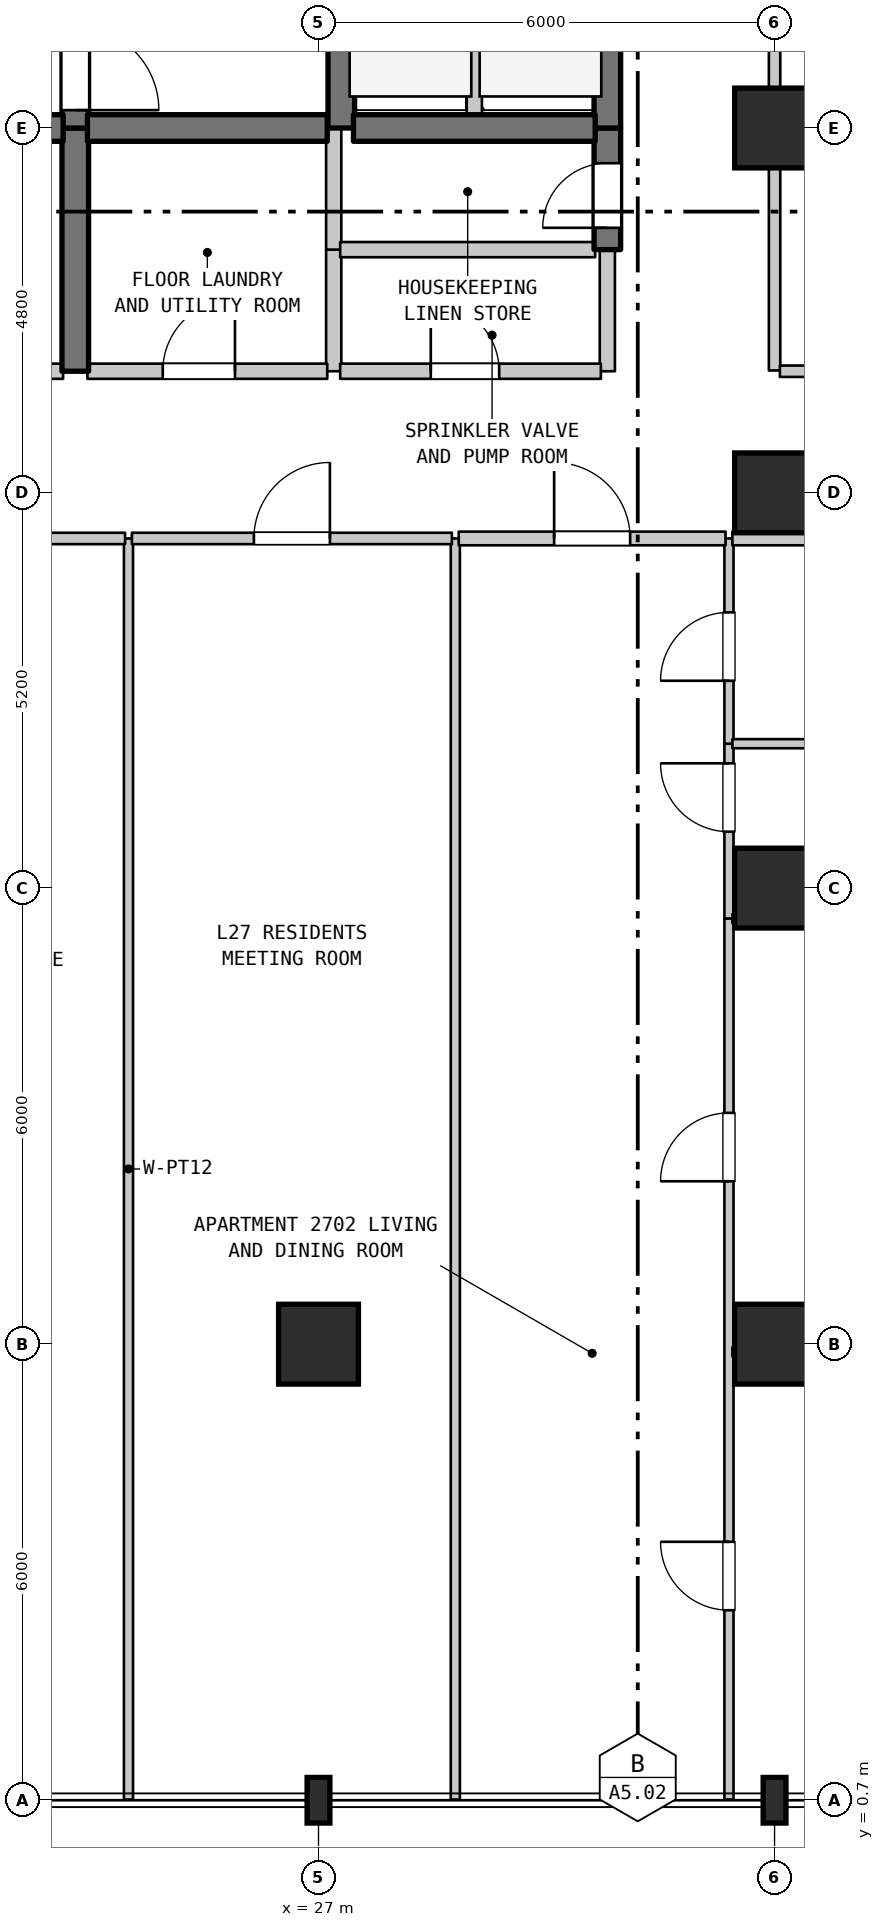
"""IFC4 building model, lengths in metres.
Left out: names, types, materials, properties, quantities, classifications, styles, units other than length and angle.
Written with IfcOpenShell. Run it as: python <this file> out.ifc"""

import sys

from ifc_helpers import new_model, si_unit, direction, frame, frame_2d, origin, origin_2d, place, context, subcontext, project, spatial, rectangle, i_section, extrude, element, fill, save


model = new_model("IFC4")
c1 = context("Model", 3, precision=1e-05, world=origin(), true_north=direction((0.0, 1.0)))
c2 = subcontext(c1, "Body", "Model", "MODEL_VIEW")
j1 = project(units=[si_unit("LENGTHUNIT", "METRE"), si_unit("PLANEANGLEUNIT", "RADIAN")], contexts=[c1])
p1 = place(None, origin())
s1 = spatial("IfcSite", under=j1, at=p1, CompositionType="ELEMENT")
p2 = place(p1, origin())
s2 = spatial("IfcBuilding", under=s1, at=p2, CompositionType="ELEMENT")
p3 = place(p2, frame((0.0, 0.0, 113.1)))
s3 = spatial("IfcBuildingStorey", under=s2, at=p3, CompositionType="ELEMENT", Elevation=113.1)
p4 = place(p3, frame((27.0, 0.7, 0.0), z_axis=(0.0, 0.0, 1.0), x_axis=(1.0, 0.0, 0.0)))
e1 = element("IfcColumn", 1, at=p4, inside=s3, PredefinedType="COLUMN", context=c2, shape_type="SweptSolid", body=[
    extrude(i_section(OverallWidth=0.3, OverallDepth=0.6, WebThickness=0.015, FlangeThickness=0.03, FilletRadius=0.027, at=origin_2d()), origin(), (0.0, 0.0, 1.0), 3.7),
])
p5 = place(p3, frame((27.0, 6.7, 0.0), z_axis=(0.0, 0.0, 1.0), x_axis=(1.0, 0.0, 0.0)))
e2 = element("IfcColumn", 2, at=p5, inside=s3, PredefinedType="COLUMN", context=c2, shape_type="SweptSolid", body=[
    extrude(rectangle(XDim=1.05, YDim=1.05, at=origin_2d()), origin(), (0.0, 0.0, 1.0), 3.7),
])
p6 = place(p3, frame((33.0, 0.7, 0.0), z_axis=(0.0, 0.0, 1.0), x_axis=(1.0, 0.0, 0.0)))
e3 = element("IfcColumn", 3, at=p6, inside=s3, PredefinedType="COLUMN", context=c2, shape_type="SweptSolid", body=[
    extrude(i_section(OverallWidth=0.3, OverallDepth=0.6, WebThickness=0.015, FlangeThickness=0.03, FilletRadius=0.027, at=origin_2d()), origin(), (0.0, 0.0, 1.0), 3.7),
])
for number, where, z_axis, x_axis in (
    (4, (33.0, 6.7, 0.0), (0.0, 0.0, 1.0), (1.0, 0.0, 0.0)),
    (5, (33.0, 12.7, 0.0), (0.0, 0.0, 1.0), (1.0, 0.0, 0.0)),
    (6, (33.0, 17.9, 0.0), (0.0, 0.0, 1.0), (1.0, 0.0, 0.0)),
    (7, (33.0, 22.7, 0.0), (0.0, 0.0, 1.0), (1.0, 0.0, 0.0)),
):
    element("IfcColumn", number, at=place(p3, frame(where, z_axis=z_axis, x_axis=x_axis)), inside=s3, PredefinedType="COLUMN", context=c2, shape_type="SweptSolid", body=[
        extrude(rectangle(XDim=1.05, YDim=1.05, at=origin_2d()), origin(), (0.0, 0.0, 1.0), 3.7),
    ])
p7 = place(p3, frame((23.8, 19.5, 0.0), z_axis=(0.0, 0.0, 1.0), x_axis=(0.0, 1.0, 0.0)))
e8 = element("IfcWall", 8, at=p7, inside=s3, PredefinedType="SHEAR", context=c2, shape_type="SweptSolid", body=[
    extrude(rectangle(XDim=3.2, YDim=0.35, at=frame_2d((1.6, 0.0))), origin(), (0.0, 0.0, 1.0), 3.385),
])
p8 = place(p3, frame((23.8, 22.7, 0.0), z_axis=(0.0, 0.0, 1.0), x_axis=(0.0, 1.0, 0.0)))
e9 = element("IfcWall", 9, at=p8, inside=s3, PredefinedType="SHEAR", context=c2, shape_type="SweptSolid", body=[
    extrude(rectangle(XDim=5.5, YDim=0.35, at=frame_2d((2.75, 0.0))), origin(), (0.0, 0.0, 1.0), 3.385),
])
p9 = place(p8, frame((0.235, 0.0, 0.0)))
e10 = element("IfcOpeningElement", 10, at=p9, cuts=e9, PredefinedType="OPENING", context=c2, shape_type="SweptSolid", body=[
    extrude(rectangle(XDim=1.1, YDim=2.15, at=frame_2d((0.55, 1.075))), frame((0.0, 0.185, 0.0), z_axis=(0.0, -1.0, 0.0), x_axis=(1.0, 0.0, 0.0)), (0.0, 0.0, 1.0), 0.37),
])
p10 = place(p3, frame((24.5, 0.71, 0.0), z_axis=(0.0, 0.0, 1.0), x_axis=(0.0, 1.0, 0.0)))
e11 = element("IfcWall", 11, at=p10, inside=s3, PredefinedType="PARTITIONING", context=c2, shape_type="SweptSolid", body=[
    extrude(rectangle(XDim=16.59, YDim=0.12, at=frame_2d((8.295, 0.0))), origin(), (0.0, 0.0, 1.0), 3.385),
])
p11 = place(p3, frame((27.2, 19.5, 0.0), z_axis=(0.0, 0.0, 1.0), x_axis=(0.0, 1.0, 0.0)))
e12 = element("IfcWall", 12, at=p11, inside=s3, PredefinedType="STANDARD", context=c2, shape_type="SweptSolid", body=[
    extrude(rectangle(XDim=1.6, YDim=0.2, at=frame_2d((0.8, 0.0))), origin(), (0.0, 0.0, 1.0), 3.385),
])
p12 = place(p3, frame((27.2, 21.1, 0.0), z_axis=(0.0, 0.0, 1.0), x_axis=(0.0, 1.0, 0.0)))
e13 = element("IfcWall", 13, at=p12, inside=s3, PredefinedType="STANDARD", context=c2, shape_type="SweptSolid", body=[
    extrude(rectangle(XDim=1.6, YDim=0.2, at=frame_2d((0.8, 0.0))), origin(), (0.0, 0.0, 1.0), 3.385),
])
p13 = place(p3, frame((27.3, 22.7, 0.0), z_axis=(0.0, 0.0, 1.0), x_axis=(0.0, 1.0, 0.0)))
e14 = element("IfcWall", 14, at=p13, inside=s3, PredefinedType="SHEAR", context=c2, shape_type="SweptSolid", body=[
    extrude(rectangle(XDim=2.9, YDim=0.35, at=frame_2d((1.45, 0.0))), origin(), (0.0, 0.0, 1.0), 3.385),
])
p14 = place(p3, frame((28.8, 0.71, 0.0), z_axis=(0.0, 0.0, 1.0), x_axis=(0.0, 1.0, 0.0)))
e15 = element("IfcWall", 15, at=p14, inside=s3, PredefinedType="PARTITIONING", context=c2, shape_type="SweptSolid", body=[
    extrude(rectangle(XDim=16.59, YDim=0.12, at=frame_2d((8.295, 0.0))), origin(), (0.0, 0.0, 1.0), 3.385),
])
p15 = place(p3, frame((29.05, 22.7, 0.0), z_axis=(0.0, 0.0, 1.0), x_axis=(0.0, 1.0, 0.0)))
e16 = element("IfcWall", 16, at=p15, inside=s3, PredefinedType="STANDARD", context=c2, shape_type="SweptSolid", body=[
    extrude(rectangle(XDim=2.9, YDim=0.2, at=frame_2d((1.45, 0.0))), origin(), (0.0, 0.0, 1.0), 3.385),
])
p16 = place(p3, frame((30.8, 19.5, 0.0), z_axis=(0.0, 0.0, 1.0), x_axis=(0.0, 1.0, 0.0)))
e17 = element("IfcWall", 17, at=p16, inside=s3, PredefinedType="STANDARD", context=c2, shape_type="SweptSolid", body=[
    extrude(rectangle(XDim=1.6, YDim=0.2, at=frame_2d((0.8, 0.0))), origin(), (0.0, 0.0, 1.0), 3.385),
])
p17 = place(p3, frame((30.8, 21.1, 0.0), z_axis=(0.0, 0.0, 1.0), x_axis=(0.0, 1.0, 0.0)))
e18 = element("IfcWall", 18, at=p17, inside=s3, PredefinedType="SHEAR", context=c2, shape_type="SweptSolid", body=[
    extrude(rectangle(XDim=1.6, YDim=0.35, at=frame_2d((0.8, 0.0))), origin(), (0.0, 0.0, 1.0), 3.385),
])
p18 = place(p17, frame((0.287, 0.0, 0.0)))
e19 = element("IfcOpeningElement", 19, at=p18, cuts=e18, PredefinedType="OPENING", context=c2, shape_type="SweptSolid", body=[
    extrude(rectangle(XDim=0.85, YDim=2.1, at=frame_2d((0.425, 1.05))), frame((0.0, 0.185, 0.0), z_axis=(0.0, -1.0, 0.0), x_axis=(1.0, 0.0, 0.0)), (0.0, 0.0, 1.0), 0.37),
])
p19 = place(p3, frame((30.8, 22.7, 0.0), z_axis=(0.0, 0.0, 1.0), x_axis=(0.0, 1.0, 0.0)))
e20 = element("IfcWall", 20, at=p19, inside=s3, PredefinedType="SHEAR", context=c2, shape_type="SweptSolid", body=[
    extrude(rectangle(XDim=2.9, YDim=0.35, at=frame_2d((1.45, 0.0))), origin(), (0.0, 0.0, 1.0), 3.385),
])
p20 = place(p3, frame((32.4, 0.71, 0.0), z_axis=(0.0, 0.0, 1.0), x_axis=(0.0, 1.0, 0.0)))
e21 = element("IfcWall", 21, at=p20, inside=s3, PredefinedType="PARTITIONING", context=c2, shape_type="SweptSolid", body=[
    extrude(rectangle(XDim=11.59, YDim=0.12, at=frame_2d((5.795, 0.0))), origin(), (0.0, 0.0, 1.0), 3.385),
])
p21 = place(p20, frame((2.49, 0.0, 0.0)))
e22 = element("IfcOpeningElement", 22, at=p21, cuts=e21, PredefinedType="OPENING", context=c2, shape_type="SweptSolid", body=[
    extrude(rectangle(XDim=0.9, YDim=2.15, at=frame_2d((0.45, 1.075))), frame((0.0, 0.07, 0.0), z_axis=(0.0, -1.0, 0.0), x_axis=(1.0, 0.0, 0.0)), (0.0, 0.0, 1.0), 0.14),
])
p22 = place(p20, frame((8.133, 0.0, 0.0)))
e23 = element("IfcOpeningElement", 23, at=p22, cuts=e21, PredefinedType="OPENING", context=c2, shape_type="SweptSolid", body=[
    extrude(rectangle(XDim=0.9, YDim=2.15, at=frame_2d((0.45, 1.075))), frame((0.0, 0.07, 0.0), z_axis=(0.0, -1.0, 0.0), x_axis=(1.0, 0.0, 0.0)), (0.0, 0.0, 1.0), 0.14),
])
p23 = place(p3, frame((32.4, 12.3, 0.0), z_axis=(0.0, 0.0, 1.0), x_axis=(0.0, 1.0, 0.0)))
e24 = element("IfcWall", 24, at=p23, inside=s3, PredefinedType="PARTITIONING", context=c2, shape_type="SweptSolid", body=[
    extrude(rectangle(XDim=2.3, YDim=0.12, at=frame_2d((1.15, 0.0))), origin(), (0.0, 0.0, 1.0), 3.385),
])
p24 = place(p23, frame((1.142, 0.0, 0.0)))
e25 = element("IfcOpeningElement", 25, at=p24, cuts=e24, PredefinedType="OPENING", context=c2, shape_type="SweptSolid", body=[
    extrude(rectangle(XDim=0.9, YDim=2.15, at=frame_2d((0.45, 1.075))), frame((0.0, 0.07, 0.0), z_axis=(0.0, -1.0, 0.0), x_axis=(1.0, 0.0, 0.0)), (0.0, 0.0, 1.0), 0.14),
])
p25 = place(p3, frame((32.4, 14.6, 0.0), z_axis=(0.0, 0.0, 1.0), x_axis=(0.0, 1.0, 0.0)))
e26 = element("IfcWall", 26, at=p25, inside=s3, PredefinedType="PARTITIONING", context=c2, shape_type="SweptSolid", body=[
    extrude(rectangle(XDim=2.7, YDim=0.12, at=frame_2d((1.35, 0.0))), origin(), (0.0, 0.0, 1.0), 3.385),
])
p26 = place(p25, frame((0.828, 0.0, 0.0)))
e27 = element("IfcOpeningElement", 27, at=p26, cuts=e26, PredefinedType="OPENING", context=c2, shape_type="SweptSolid", body=[
    extrude(rectangle(XDim=0.9, YDim=2.1, at=frame_2d((0.45, 1.05))), frame((0.0, 0.07, 0.0), z_axis=(0.0, -1.0, 0.0), x_axis=(1.0, 0.0, 0.0)), (0.0, 0.0, 1.0), 0.14),
])
p27 = place(p3, frame((33.0, 19.51, 0.0), z_axis=(0.0, 0.0, 1.0), x_axis=(0.0, 1.0, 0.0)))
e28 = element("IfcWall", 28, at=p27, inside=s3, PredefinedType="STANDARD", context=c2, shape_type="SweptSolid", body=[
    extrude(rectangle(XDim=6.18, YDim=0.15, at=frame_2d((3.09, 0.0))), origin(), (0.0, 0.0, 1.0), 2.935),
])
p28 = place(p3, frame((32.445, 6.6, 0.0), z_axis=(0.0, 0.0, 1.0), x_axis=(1.0, 0.0, 0.0)))
e29 = element("IfcWall", 29, at=p28, inside=s3, PredefinedType="PARTITIONING", context=c2, shape_type="SweptSolid", body=[
    extrude(rectangle(XDim=4.16, YDim=0.12, at=frame_2d((2.08, 0.0))), origin(), (0.0, 0.0, 1.0), 2.935),
])
for number, where, z_axis, x_axis in (
    (30, (32.445, 12.3, 0.0), (0.0, 0.0, 1.0), (1.0, 0.0, 0.0)),
    (31, (32.445, 14.6, 0.0), (0.0, 0.0, 1.0), (1.0, 0.0, 0.0)),
):
    element("IfcWall", number, at=place(p3, frame(where, z_axis=z_axis, x_axis=x_axis)), inside=s3, PredefinedType="PARTITIONING", context=c2, shape_type="SweptSolid", body=[
        extrude(rectangle(XDim=4.16, YDim=0.12, at=frame_2d((2.08, 0.0))), origin(), (0.0, 0.0, 1.0), 3.385),
    ])
p29 = place(p3, frame((20.545, 17.3, 0.0), z_axis=(0.0, 0.0, 1.0), x_axis=(1.0, 0.0, 0.0)))
e32 = element("IfcWall", 32, at=p29, inside=s3, PredefinedType="STANDARD", context=c2, shape_type="SweptSolid", body=[
    extrude(rectangle(XDim=3.91, YDim=0.15, at=frame_2d((1.955, 0.0))), origin(), (0.0, 0.0, 1.0), 3.385),
])
p30 = place(p29, frame((1.455, 0.0, 0.0)))
e33 = element("IfcOpeningElement", 33, at=p30, cuts=e32, PredefinedType="OPENING", context=c2, shape_type="SweptSolid", body=[
    extrude(rectangle(XDim=1.0, YDim=2.15, at=frame_2d((0.5, 1.075))), frame((0.0, 0.085, 0.0), z_axis=(0.0, -1.0, 0.0), x_axis=(1.0, 0.0, 0.0)), (0.0, 0.0, 1.0), 0.17),
])
p31 = place(p3, frame((24.545, 17.3, 0.0), z_axis=(0.0, 0.0, 1.0), x_axis=(1.0, 0.0, 0.0)))
e34 = element("IfcWall", 34, at=p31, inside=s3, PredefinedType="STANDARD", context=c2, shape_type="SweptSolid", body=[
    extrude(rectangle(XDim=4.21, YDim=0.15, at=frame_2d((2.105, 0.0))), origin(), (0.0, 0.0, 1.0), 3.385),
])
p32 = place(p31, frame((1.605, 0.0, 0.0)))
e35 = element("IfcOpeningElement", 35, at=p32, cuts=e34, PredefinedType="OPENING", context=c2, shape_type="SweptSolid", body=[
    extrude(rectangle(XDim=1.0, YDim=2.15, at=frame_2d((0.5, 1.075))), frame((0.0, 0.085, 0.0), z_axis=(0.0, -1.0, 0.0), x_axis=(1.0, 0.0, 0.0)), (0.0, 0.0, 1.0), 0.17),
])
p33 = place(p3, frame((28.845, 17.3, 0.0), z_axis=(0.0, 0.0, 1.0), x_axis=(1.0, 0.0, 0.0)))
e36 = element("IfcWall", 36, at=p33, inside=s3, PredefinedType="STANDARD", context=c2, shape_type="SweptSolid", body=[
    extrude(rectangle(XDim=3.51, YDim=0.18, at=frame_2d((1.755, 0.0))), origin(), (0.0, 0.0, 1.0), 3.385),
])
p34 = place(p33, frame((1.255, 0.0, 0.0)))
e37 = element("IfcOpeningElement", 37, at=p34, cuts=e36, PredefinedType="OPENING", context=c2, shape_type="SweptSolid", body=[
    extrude(rectangle(XDim=1.0, YDim=2.15, at=frame_2d((0.5, 1.075))), frame((0.0, 0.1, 0.0), z_axis=(0.0, -1.0, 0.0), x_axis=(1.0, 0.0, 0.0)), (0.0, 0.0, 1.0), 0.2),
])
p35 = place(p3, frame((32.445, 17.3, 0.0), z_axis=(0.0, 0.0, 1.0), x_axis=(1.0, 0.0, 0.0)))
e38 = element("IfcWall", 38, at=p35, inside=s3, PredefinedType="STANDARD", context=c2, shape_type="SweptSolid", body=[
    extrude(rectangle(XDim=4.16, YDim=0.18, at=frame_2d((2.08, 0.0))), origin(), (0.0, 0.0, 1.0), 3.385),
])
p36 = place(p3, frame((19.16, 19.5, 0.0), z_axis=(0.0, 0.0, 1.0), x_axis=(1.0, 0.0, 0.0)))
e39 = element("IfcWall", 39, at=p36, inside=s3, PredefinedType="STANDARD", context=c2, shape_type="SweptSolid", body=[
    extrude(rectangle(XDim=4.48, YDim=0.2, at=frame_2d((2.24, 0.0))), origin(), (0.0, 0.0, 1.0), 3.385),
])
p37 = place(p36, frame((1.64, 0.0, 0.0)))
e40 = element("IfcOpeningElement", 40, at=p37, cuts=e39, PredefinedType="OPENING", context=c2, shape_type="SweptSolid", body=[
    extrude(rectangle(XDim=1.2, YDim=2.2, at=frame_2d((0.6, 1.1))), frame((0.0, 0.11, 0.0), z_axis=(0.0, -1.0, 0.0), x_axis=(1.0, 0.0, 0.0)), (0.0, 0.0, 1.0), 0.22),
])
p38 = place(p3, frame((23.96, 19.5, 0.0), z_axis=(0.0, 0.0, 1.0), x_axis=(1.0, 0.0, 0.0)))
e41 = element("IfcWall", 41, at=p38, inside=s3, PredefinedType="STANDARD", context=c2, shape_type="SweptSolid", body=[
    extrude(rectangle(XDim=3.155, YDim=0.2, at=frame_2d((1.578, 0.0))), origin(), (0.0, 0.0, 1.0), 3.385),
])
p39 = place(p38, frame((0.991, 0.0, 0.0)))
e42 = element("IfcOpeningElement", 42, at=p39, cuts=e41, PredefinedType="OPENING", context=c2, shape_type="SweptSolid", body=[
    extrude(rectangle(XDim=0.95, YDim=2.15, at=frame_2d((0.475, 1.075))), frame((0.0, 0.11, 0.0), z_axis=(0.0, -1.0, 0.0), x_axis=(1.0, 0.0, 0.0)), (0.0, 0.0, 1.0), 0.22),
])
p40 = place(p3, frame((27.285, 19.5, 0.0), z_axis=(0.0, 0.0, 1.0), x_axis=(1.0, 0.0, 0.0)))
e43 = element("IfcWall", 43, at=p40, inside=s3, PredefinedType="STANDARD", context=c2, shape_type="SweptSolid", body=[
    extrude(rectangle(XDim=3.43, YDim=0.2, at=frame_2d((1.715, 0.0))), origin(), (0.0, 0.0, 1.0), 3.385),
])
p41 = place(p40, frame((1.192, 0.0, 0.0)))
e44 = element("IfcOpeningElement", 44, at=p41, cuts=e43, PredefinedType="OPENING", context=c2, shape_type="SweptSolid", body=[
    extrude(rectangle(XDim=0.9, YDim=2.15, at=frame_2d((0.45, 1.075))), frame((0.0, 0.11, 0.0), z_axis=(0.0, -1.0, 0.0), x_axis=(1.0, 0.0, 0.0)), (0.0, 0.0, 1.0), 0.22),
])
p42 = place(p3, frame((33.07, 19.5, 0.0), z_axis=(0.0, 0.0, 1.0), x_axis=(1.0, 0.0, 0.0)))
e45 = element("IfcWall", 45, at=p42, inside=s3, PredefinedType="STANDARD", context=c2, shape_type="SweptSolid", body=[
    extrude(rectangle(XDim=21.51, YDim=0.15, at=frame_2d((10.755, 0.0))), origin(), (0.0, 0.0, 1.0), 3.385),
])
p43 = place(p3, frame((27.285, 21.1, 0.0), z_axis=(0.0, 0.0, 1.0), x_axis=(1.0, 0.0, 0.0)))
e46 = element("IfcWall", 46, at=p43, inside=s3, PredefinedType="STANDARD", context=c2, shape_type="SweptSolid", body=[
    extrude(rectangle(XDim=3.355, YDim=0.2, at=frame_2d((1.677, 0.0))), origin(), (0.0, 0.0, 1.0), 3.385),
])
p44 = place(p3, frame((19.16, 22.7, 0.0), z_axis=(0.0, 0.0, 1.0), x_axis=(1.0, 0.0, 0.0)))
e47 = element("IfcWall", 47, at=p44, inside=s3, PredefinedType="SHEAR", context=c2, shape_type="SweptSolid", body=[
    extrude(rectangle(XDim=4.48, YDim=0.35, at=frame_2d((2.24, 0.0))), origin(), (0.0, 0.0, 1.0), 3.385),
])
p45 = place(p44, frame((1.64, 0.0, 0.0)))
e48 = element("IfcOpeningElement", 48, at=p45, cuts=e47, PredefinedType="OPENING", context=c2, shape_type="SweptSolid", body=[
    extrude(rectangle(XDim=1.2, YDim=2.2, at=frame_2d((0.6, 1.1))), frame((0.0, 0.185, 0.0), z_axis=(0.0, -1.0, 0.0), x_axis=(1.0, 0.0, 0.0)), (0.0, 0.0, 1.0), 0.37),
])
p46 = place(p3, frame((23.96, 22.7, 0.0), z_axis=(0.0, 0.0, 1.0), x_axis=(1.0, 0.0, 0.0)))
e49 = element("IfcWall", 49, at=p46, inside=s3, PredefinedType="SHEAR", context=c2, shape_type="SweptSolid", body=[
    extrude(rectangle(XDim=3.155, YDim=0.35, at=frame_2d((1.578, 0.0))), origin(), (0.0, 0.0, 1.0), 3.385),
])
p47 = place(p3, frame((27.46, 22.7, 0.0), z_axis=(0.0, 0.0, 1.0), x_axis=(1.0, 0.0, 0.0)))
e50 = element("IfcWall", 50, at=p47, inside=s3, PredefinedType="SHEAR", context=c2, shape_type="SweptSolid", body=[
    extrude(rectangle(XDim=3.18, YDim=0.35, at=frame_2d((1.59, 0.0))), origin(), (0.0, 0.0, 1.0), 3.385),
])
p48 = place(p9, frame((1.1, 0.0, 0.0), z_axis=(0.0, 0.0, 1.0), x_axis=(-1.0, 0.0, 0.0)))
e51 = element("IfcDoor", 51, at=p48, inside=s3, OperationType="SINGLE_SWING_LEFT", PredefinedType="DOOR", context=c2, shape_type="SweptSolid", body=[
    extrude(rectangle(XDim=1.1, YDim=2.15, at=frame_2d((0.55, 1.075))), frame((0.0, 0.025, 0.0), z_axis=(0.0, -1.0, 0.0), x_axis=(1.0, 0.0, 0.0)), (0.0, 0.0, 1.0), 0.05),
])
fill(e10, e51)
p49 = place(p18, origin())
e52 = element("IfcDoor", 52, at=p49, inside=s3, OperationType="SINGLE_SWING_LEFT", PredefinedType="DOOR", context=c2, shape_type="SweptSolid", body=[
    extrude(rectangle(XDim=0.85, YDim=2.1, at=frame_2d((0.425, 1.05))), frame((0.0, 0.025, 0.0), z_axis=(0.0, -1.0, 0.0), x_axis=(1.0, 0.0, 0.0)), (0.0, 0.0, 1.0), 0.05),
])
fill(e19, e52)
p50 = place(p21, origin())
e53 = element("IfcDoor", 53, at=p50, inside=s3, OperationType="SINGLE_SWING_RIGHT", PredefinedType="DOOR", context=c2, shape_type="SweptSolid", body=[
    extrude(rectangle(XDim=0.9, YDim=2.15, at=frame_2d((0.45, 1.075))), frame((0.0, 0.025, 0.0), z_axis=(0.0, -1.0, 0.0), x_axis=(1.0, 0.0, 0.0)), (0.0, 0.0, 1.0), 0.05),
])
fill(e22, e53)
p51 = place(p22, origin())
e54 = element("IfcDoor", 54, at=p51, inside=s3, OperationType="SINGLE_SWING_LEFT", PredefinedType="DOOR", context=c2, shape_type="SweptSolid", body=[
    extrude(rectangle(XDim=0.9, YDim=2.15, at=frame_2d((0.45, 1.075))), frame((0.0, 0.025, 0.0), z_axis=(0.0, -1.0, 0.0), x_axis=(1.0, 0.0, 0.0)), (0.0, 0.0, 1.0), 0.05),
])
fill(e23, e54)
p52 = place(p24, origin())
e55 = element("IfcDoor", 55, at=p52, inside=s3, OperationType="SINGLE_SWING_RIGHT", PredefinedType="DOOR", context=c2, shape_type="SweptSolid", body=[
    extrude(rectangle(XDim=0.9, YDim=2.15, at=frame_2d((0.45, 1.075))), frame((0.0, 0.025, 0.0), z_axis=(0.0, -1.0, 0.0), x_axis=(1.0, 0.0, 0.0)), (0.0, 0.0, 1.0), 0.05),
])
fill(e25, e55)
p53 = place(p26, origin())
e56 = element("IfcDoor", 56, at=p53, inside=s3, OperationType="SINGLE_SWING_LEFT", PredefinedType="DOOR", context=c2, shape_type="SweptSolid", body=[
    extrude(rectangle(XDim=0.9, YDim=2.1, at=frame_2d((0.45, 1.05))), frame((0.0, 0.025, 0.0), z_axis=(0.0, -1.0, 0.0), x_axis=(1.0, 0.0, 0.0)), (0.0, 0.0, 1.0), 0.05),
])
fill(e27, e56)
p54 = place(p32, origin())
e57 = element("IfcDoor", 57, at=p54, inside=s3, OperationType="SINGLE_SWING_RIGHT", PredefinedType="DOOR", context=c2, shape_type="SweptSolid", body=[
    extrude(rectangle(XDim=1.0, YDim=2.15, at=frame_2d((0.5, 1.075))), frame((0.0, 0.025, 0.0), z_axis=(0.0, -1.0, 0.0), x_axis=(1.0, 0.0, 0.0)), (0.0, 0.0, 1.0), 0.05),
])
fill(e35, e57)
p55 = place(p34, origin())
e58 = element("IfcDoor", 58, at=p55, inside=s3, OperationType="SINGLE_SWING_LEFT", PredefinedType="DOOR", context=c2, shape_type="SweptSolid", body=[
    extrude(rectangle(XDim=1.0, YDim=2.15, at=frame_2d((0.5, 1.075))), frame((0.0, 0.025, 0.0), z_axis=(0.0, -1.0, 0.0), x_axis=(1.0, 0.0, 0.0)), (0.0, 0.0, 1.0), 0.05),
])
fill(e37, e58)
p56 = place(p39, origin())
e59 = element("IfcDoor", 59, at=p56, inside=s3, OperationType="SINGLE_SWING_RIGHT", PredefinedType="DOOR", context=c2, shape_type="SweptSolid", body=[
    extrude(rectangle(XDim=0.95, YDim=2.15, at=frame_2d((0.475, 1.075))), frame((0.0, 0.025, 0.0), z_axis=(0.0, -1.0, 0.0), x_axis=(1.0, 0.0, 0.0)), (0.0, 0.0, 1.0), 0.05),
])
fill(e42, e59)
p57 = place(p41, origin())
e60 = element("IfcDoor", 60, at=p57, inside=s3, OperationType="SINGLE_SWING_LEFT", PredefinedType="DOOR", context=c2, shape_type="SweptSolid", body=[
    extrude(rectangle(XDim=0.9, YDim=2.15, at=frame_2d((0.45, 1.075))), frame((0.0, 0.025, 0.0), z_axis=(0.0, -1.0, 0.0), x_axis=(1.0, 0.0, 0.0)), (0.0, 0.0, 1.0), 0.05),
])
fill(e44, e60)
save(model, sys.argv[1])
